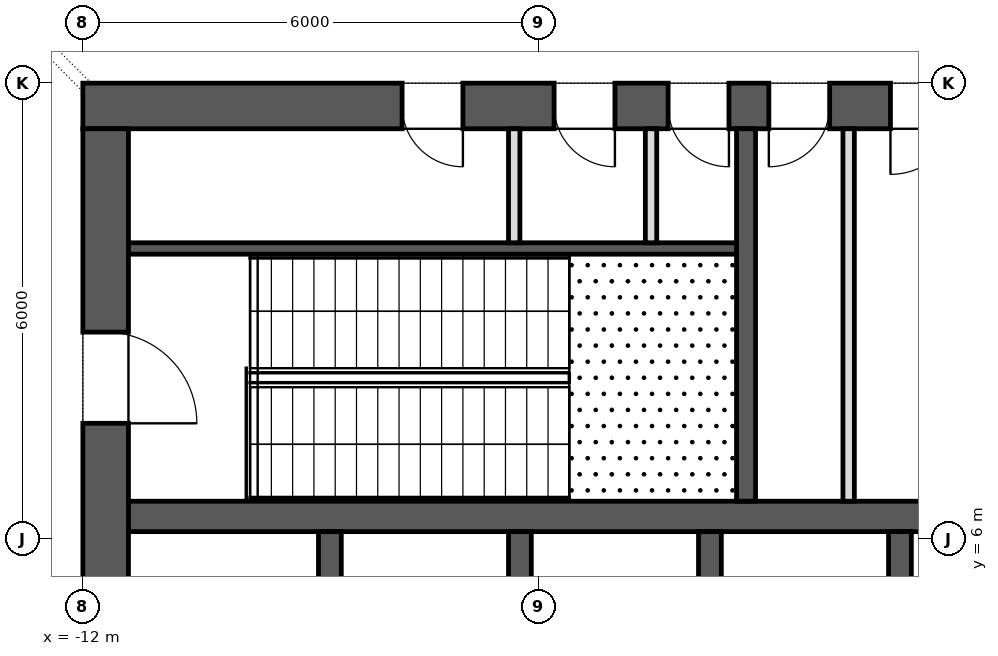
"""IFC4 building model, lengths in metres.
Left out: names, types, materials, properties, quantities, classifications, styles, units other than length and angle.
Written with IfcOpenShell. Run it as: python <this file> out.ifc"""

import sys

from ifc_helpers import new_model, si_unit, direction, frame, frame_2d, origin, place, context, subcontext, project, spatial, rectangle, extrude, element, fill, save


model = new_model("IFC4")
c1 = context("Model", 3, precision=1e-05, world=origin(), true_north=direction((0.0, 1.0)))
c2 = subcontext(c1, "Body", "Model", "MODEL_VIEW")
j1 = project(units=[si_unit("LENGTHUNIT", "METRE"), si_unit("PLANEANGLEUNIT", "RADIAN")], contexts=[c1])
p1 = place(None, origin())
s1 = spatial("IfcSite", under=j1, at=p1, CompositionType="ELEMENT")
p2 = place(p1, origin())
s2 = spatial("IfcBuilding", under=s1, at=p2, CompositionType="ELEMENT")
p3 = place(p2, frame((0.0, 0.0, 7.0)))
s3 = spatial("IfcBuildingStorey", under=s2, at=p3, CompositionType="ELEMENT", Elevation=7.0)
p4 = place(p3, frame((-12.0, 11.7, 0.0), z_axis=(0.0, 0.0, 1.0), x_axis=(1.0, 0.0, 0.0)))
e1 = element("IfcWall", 1, at=p4, inside=s3, PredefinedType="SHEAR", context=c2, shape_type="SweptSolid", body=[
    extrude(rectangle(XDim=24.0, YDim=0.6, at=frame_2d((12.0, 0.0))), origin(), (0.0, 0.0, 1.0), 5.5),
])
p5 = place(p4, frame((9.025, 0.0, 0.0)))
e2 = element("IfcOpeningElement", 2, at=p5, cuts=e1, PredefinedType="OPENING", context=c2, shape_type="SweptSolid", body=[
    extrude(rectangle(XDim=0.8, YDim=2.1, at=frame_2d((0.4, 1.05))), frame((0.0, 0.312, 0.0), z_axis=(0.0, -1.0, 0.0), x_axis=(1.0, 0.0, 0.0)), (0.0, 0.0, 1.0), 0.624),
])
p6 = place(p4, frame((10.625, 0.0, 0.0)))
e3 = element("IfcOpeningElement", 3, at=p6, cuts=e1, PredefinedType="OPENING", context=c2, shape_type="SweptSolid", body=[
    extrude(rectangle(XDim=0.9, YDim=2.1, at=frame_2d((0.45, 1.05))), frame((0.0, 0.312, 0.0), z_axis=(0.0, -1.0, 0.0), x_axis=(1.0, 0.0, 0.0)), (0.0, 0.0, 1.0), 0.624),
])
p7 = place(p4, frame((4.2, 0.0, 0.0)))
e4 = element("IfcOpeningElement", 4, at=p7, cuts=e1, PredefinedType="OPENING", context=c2, shape_type="SweptSolid", body=[
    extrude(rectangle(XDim=0.8, YDim=2.1, at=frame_2d((0.4, 1.05))), frame((0.0, 0.312, 0.0), z_axis=(0.0, -1.0, 0.0), x_axis=(1.0, 0.0, 0.0)), (0.0, 0.0, 1.0), 0.624),
])
p8 = place(p4, frame((6.2, 0.0, 0.0)))
e5 = element("IfcOpeningElement", 5, at=p8, cuts=e1, PredefinedType="OPENING", context=c2, shape_type="SweptSolid", body=[
    extrude(rectangle(XDim=0.8, YDim=2.1, at=frame_2d((0.4, 1.05))), frame((0.0, 0.312, 0.0), z_axis=(0.0, -1.0, 0.0), x_axis=(1.0, 0.0, 0.0)), (0.0, 0.0, 1.0), 0.624),
])
p9 = place(p4, frame((7.7, 0.0, 0.0)))
e6 = element("IfcOpeningElement", 6, at=p9, cuts=e1, PredefinedType="OPENING", context=c2, shape_type="SweptSolid", body=[
    extrude(rectangle(XDim=0.8, YDim=2.1, at=frame_2d((0.4, 1.05))), frame((0.0, 0.312, 0.0), z_axis=(0.0, -1.0, 0.0), x_axis=(1.0, 0.0, 0.0)), (0.0, 0.0, 1.0), 0.624),
])
p10 = place(p4, frame((15.85, 0.0, 0.0)))
e7 = element("IfcOpeningElement", 7, at=p10, cuts=e1, PredefinedType="OPENING", context=c2, shape_type="SweptSolid", body=[
    extrude(rectangle(XDim=0.8, YDim=2.1, at=frame_2d((0.4, 1.05))), frame((0.0, 0.312, 0.0), z_axis=(0.0, -1.0, 0.0), x_axis=(1.0, 0.0, 0.0)), (0.0, 0.0, 1.0), 0.624),
])
p11 = place(p3, frame((-11.7, -11.4, 0.0), z_axis=(0.0, 0.0, 1.0), x_axis=(0.0, 1.0, 0.0)))
e8 = element("IfcWall", 8, at=p11, inside=s3, PredefinedType="SHEAR", context=c2, shape_type="SweptSolid", body=[
    extrude(rectangle(XDim=22.8, YDim=0.6, at=frame_2d((11.4, 0.0))), origin(), (0.0, 0.0, 1.0), 5.5),
])
p12 = place(p11, frame((10.2, 0.0, 0.0)))
e9 = element("IfcOpeningElement", 9, at=p12, cuts=e8, PredefinedType="OPENING", context=c2, shape_type="SweptSolid", body=[
    extrude(rectangle(XDim=2.4, YDim=2.1, at=frame_2d((1.2, 1.05))), frame((0.0, 0.312, 0.0), z_axis=(0.0, -1.0, 0.0), x_axis=(1.0, 0.0, 0.0)), (0.0, 0.0, 1.0), 0.624),
])
p13 = place(p11, frame((18.925, 0.0, 0.0)))
e10 = element("IfcOpeningElement", 10, at=p13, cuts=e8, PredefinedType="OPENING", context=c2, shape_type="SweptSolid", body=[
    extrude(rectangle(XDim=1.2, YDim=2.1, at=frame_2d((0.6, 1.05))), frame((0.0, 0.312, 0.0), z_axis=(0.0, -1.0, 0.0), x_axis=(1.0, 0.0, 0.0)), (0.0, 0.0, 1.0), 0.624),
])
p14 = place(p11, frame((2.675, 0.0, 0.0)))
e11 = element("IfcOpeningElement", 11, at=p14, cuts=e8, PredefinedType="OPENING", context=c2, shape_type="SweptSolid", body=[
    extrude(rectangle(XDim=1.2, YDim=2.1, at=frame_2d((0.6, 1.05))), frame((0.0, 0.312, 0.0), z_axis=(0.0, -1.0, 0.0), x_axis=(1.0, 0.0, 0.0)), (0.0, 0.0, 1.0), 0.624),
])
p15 = place(p3, frame((-11.4, 6.3, 0.0), z_axis=(0.0, 0.0, 1.0), x_axis=(1.0, 0.0, 0.0)))
e12 = element("IfcWall", 12, at=p15, inside=s3, PredefinedType="SHEAR", context=c2, shape_type="SweptSolid", body=[
    extrude(rectangle(XDim=22.8, YDim=0.4, at=frame_2d((11.4, 0.0))), origin(), (0.0, 0.0, 1.0), 5.5),
])
p16 = place(p15, frame((20.85, 0.0, 0.0)))
e13 = element("IfcOpeningElement", 13, at=p16, cuts=e12, PredefinedType="OPENING", context=c2, shape_type="SweptSolid", body=[
    extrude(rectangle(XDim=1.1, YDim=2.1, at=frame_2d((0.55, 1.05))), frame((0.0, 0.212, 0.0), z_axis=(0.0, -1.0, 0.0), x_axis=(1.0, 0.0, 0.0)), (0.0, 0.0, 1.0), 0.424),
])
for number, where, z_axis, x_axis in (
    (14, (-8.75, 3.2, 0.0), (0.0, 0.0, 1.0), (0.0, 1.0, 0.0)),
    (15, (-6.25, 3.2, 0.0), (0.0, 0.0, 1.0), (0.0, 1.0, 0.0)),
    (16, (-3.75, 3.2, 0.0), (0.0, 0.0, 1.0), (0.0, 1.0, 0.0)),
    (17, (-1.25, 3.2, 0.0), (0.0, 0.0, 1.0), (0.0, 1.0, 0.0)),
):
    element("IfcWall", number, at=place(p3, frame(where, z_axis=z_axis, x_axis=x_axis)), inside=s3, PredefinedType="SHEAR", context=c2, shape_type="SweptSolid", body=[
        extrude(rectangle(XDim=2.9, YDim=0.3, at=frame_2d((1.45, 0.0))), origin(), (0.0, 0.0, 1.0), 5.5),
    ])
p17 = place(p3, frame((-3.275, 6.5, 0.0), z_axis=(0.0, 0.0, 1.0), x_axis=(0.0, 1.0, 0.0)))
e18 = element("IfcWall", 18, at=p17, inside=s3, PredefinedType="SHEAR", context=c2, shape_type="SweptSolid", body=[
    extrude(rectangle(XDim=4.9, YDim=0.25, at=frame_2d((2.45, 0.0))), origin(), (0.0, 0.0, 1.0), 5.15),
])
p18 = place(p3, frame((-11.4, 9.825, 0.0), z_axis=(0.0, 0.0, 1.0), x_axis=(1.0, 0.0, 0.0)))
e19 = element("IfcWall", 19, at=p18, inside=s3, PredefinedType="SHEAR", context=c2, shape_type="SweptSolid", body=[
    extrude(rectangle(XDim=8.0, YDim=0.15, at=frame_2d((4.0, 0.0))), origin(), (0.0, 0.0, 1.0), 5.15),
])
p19 = place(p3, frame((-1.925, 6.5, 0.0), z_axis=(0.0, 0.0, 1.0), x_axis=(0.0, 1.0, 0.0)))
e20 = element("IfcWall", 20, at=p19, inside=s3, PredefinedType="PARTITIONING", context=c2, shape_type="SweptSolid", body=[
    extrude(rectangle(XDim=4.9, YDim=0.15, at=frame_2d((2.45, 0.0))), origin(), (0.0, 0.0, 1.0), 5.15),
])
for number, where, z_axis, x_axis in (
    (21, (-6.325, 9.9, 0.0), (0.0, 0.0, 1.0), (0.0, 1.0, 0.0)),
    (22, (-4.525, 9.9, 0.0), (0.0, 0.0, 1.0), (0.0, 1.0, 0.0)),
):
    element("IfcWall", number, at=place(p3, frame(where, z_axis=z_axis, x_axis=x_axis)), inside=s3, PredefinedType="PARTITIONING", context=c2, shape_type="SweptSolid", body=[
        extrude(rectangle(XDim=1.5, YDim=0.15, at=frame_2d((0.75, 0.0))), origin(), (0.0, 0.0, 1.0), 5.15),
    ])
p20 = place(p13, frame((1.2, 0.0, 0.0), z_axis=(0.0, 0.0, 1.0), x_axis=(-1.0, 0.0, 0.0)))
e23 = element("IfcDoor", 23, at=p20, inside=s3, OperationType="SINGLE_SWING_LEFT", PredefinedType="DOOR", context=c2, shape_type="SweptSolid", body=[
    extrude(rectangle(XDim=1.2, YDim=2.1, at=frame_2d((0.6, 1.05))), frame((0.0, 0.025, 0.0), z_axis=(0.0, -1.0, 0.0), x_axis=(1.0, 0.0, 0.0)), (0.0, 0.0, 1.0), 0.05),
])
fill(e10, e23)
p21 = place(p5, frame((0.8, 0.0, 0.0), z_axis=(0.0, 0.0, 1.0), x_axis=(-1.0, 0.0, 0.0)))
e24 = element("IfcDoor", 24, at=p21, inside=s3, OperationType="SINGLE_SWING_LEFT", PredefinedType="DOOR", context=c2, shape_type="SweptSolid", body=[
    extrude(rectangle(XDim=0.8, YDim=2.1, at=frame_2d((0.4, 1.05))), frame((0.0, 0.025, 0.0), z_axis=(0.0, -1.0, 0.0), x_axis=(1.0, 0.0, 0.0)), (0.0, 0.0, 1.0), 0.05),
])
fill(e2, e24)
p22 = place(p6, frame((0.9, 0.0, 0.0), z_axis=(0.0, 0.0, 1.0), x_axis=(-1.0, 0.0, 0.0)))
e25 = element("IfcDoor", 25, at=p22, inside=s3, OperationType="SINGLE_SWING_LEFT", PredefinedType="DOOR", context=c2, shape_type="SweptSolid", body=[
    extrude(rectangle(XDim=0.9, YDim=2.1, at=frame_2d((0.45, 1.05))), frame((0.0, 0.025, 0.0), z_axis=(0.0, -1.0, 0.0), x_axis=(1.0, 0.0, 0.0)), (0.0, 0.0, 1.0), 0.05),
])
fill(e3, e25)
p23 = place(p7, frame((0.8, 0.0, 0.0), z_axis=(0.0, 0.0, 1.0), x_axis=(-1.0, 0.0, 0.0)))
e26 = element("IfcDoor", 26, at=p23, inside=s3, OperationType="SINGLE_SWING_RIGHT", PredefinedType="DOOR", context=c2, shape_type="SweptSolid", body=[
    extrude(rectangle(XDim=0.8, YDim=2.1, at=frame_2d((0.4, 1.05))), frame((0.0, 0.025, 0.0), z_axis=(0.0, -1.0, 0.0), x_axis=(1.0, 0.0, 0.0)), (0.0, 0.0, 1.0), 0.05),
])
fill(e4, e26)
p24 = place(p8, frame((0.8, 0.0, 0.0), z_axis=(0.0, 0.0, 1.0), x_axis=(-1.0, 0.0, 0.0)))
e27 = element("IfcDoor", 27, at=p24, inside=s3, OperationType="SINGLE_SWING_RIGHT", PredefinedType="DOOR", context=c2, shape_type="SweptSolid", body=[
    extrude(rectangle(XDim=0.8, YDim=2.1, at=frame_2d((0.4, 1.05))), frame((0.0, 0.025, 0.0), z_axis=(0.0, -1.0, 0.0), x_axis=(1.0, 0.0, 0.0)), (0.0, 0.0, 1.0), 0.05),
])
fill(e5, e27)
p25 = place(p9, frame((0.8, 0.0, 0.0), z_axis=(0.0, 0.0, 1.0), x_axis=(-1.0, 0.0, 0.0)))
e28 = element("IfcDoor", 28, at=p25, inside=s3, OperationType="SINGLE_SWING_RIGHT", PredefinedType="DOOR", context=c2, shape_type="SweptSolid", body=[
    extrude(rectangle(XDim=0.8, YDim=2.1, at=frame_2d((0.4, 1.05))), frame((0.0, 0.025, 0.0), z_axis=(0.0, -1.0, 0.0), x_axis=(1.0, 0.0, 0.0)), (0.0, 0.0, 1.0), 0.05),
])
fill(e6, e28)
save(model, sys.argv[1])
